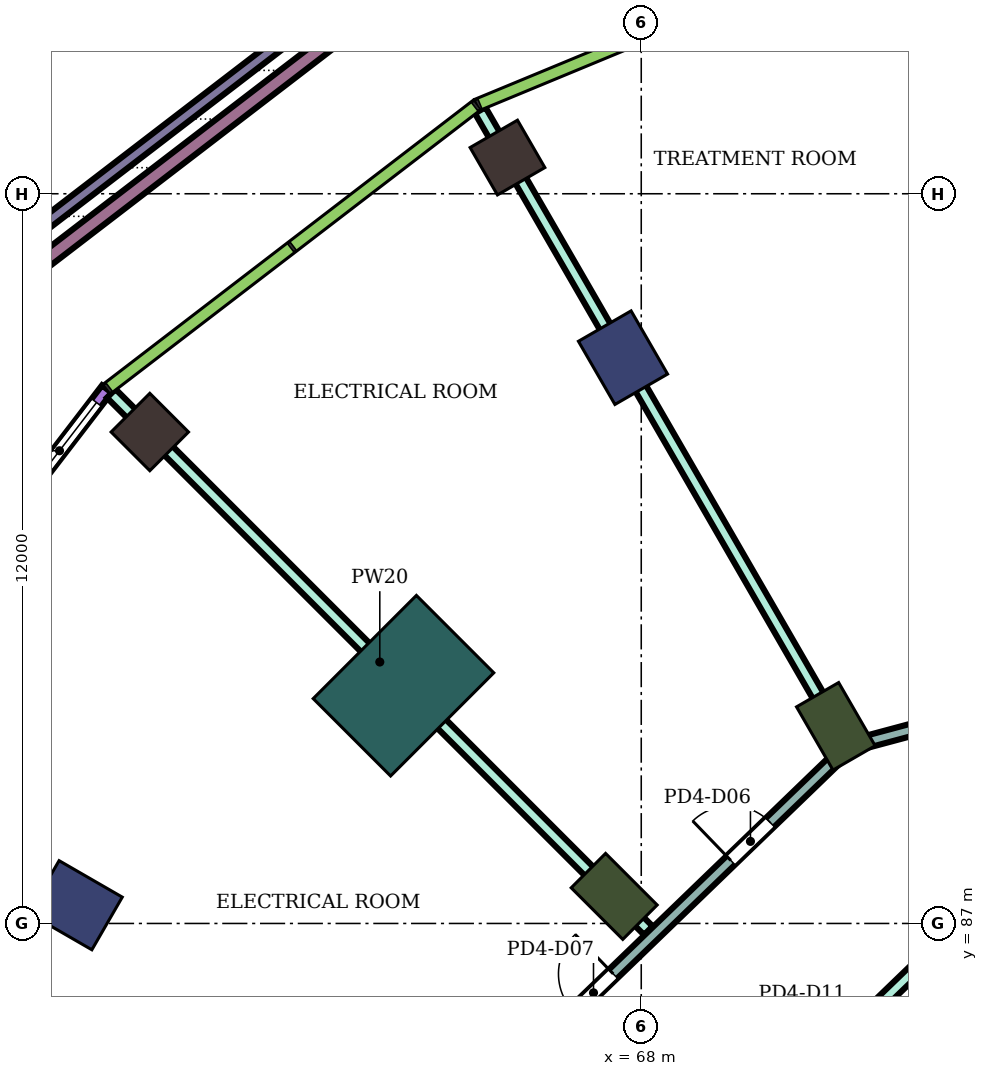
"""IFC4 building model, lengths in metres.
Left out: names, types, materials, properties, quantities, classifications, styles, units other than length and angle.
Written with IfcOpenShell. Run it as: python <this file> out.ifc"""

import sys

from ifc_helpers import new_model, si_unit, direction, frame, frame_2d, origin, origin_2d, place, context, subcontext, project, spatial, rectangle, extrude, element, fill, save


model = new_model("IFC4")
c1 = context("Model", 3, precision=1e-05, world=origin(), true_north=direction((0.0, 1.0)))
c2 = subcontext(c1, "Body", "Model", "MODEL_VIEW")
j1 = project(units=[si_unit("LENGTHUNIT", "METRE"), si_unit("PLANEANGLEUNIT", "RADIAN")], contexts=[c1])
p1 = place(None, origin())
s1 = spatial("IfcSite", under=j1, at=p1, CompositionType="ELEMENT")
p2 = place(p1, origin())
s2 = spatial("IfcBuilding", under=s1, at=p2, CompositionType="ELEMENT")
p3 = place(p2, frame((0.0, 0.0, 23.8)))
s3 = spatial("IfcBuildingStorey", under=s2, at=p3, CompositionType="ELEMENT", Elevation=23.8)
for number, where, z_axis, x_axis in (
    (1, (65.8, 99.595, 0.0), (0.0, 0.0, 1.0), (-0.5, 0.866, 0.0)),
    (2, (59.918, 95.082, 0.0), (0.0, 0.0, 1.0), (-0.707, 0.707, 0.0)),
):
    element("IfcColumn", number, at=place(p3, frame(where, z_axis=z_axis, x_axis=x_axis)), inside=s3, PredefinedType="COLUMN", context=c2, shape_type="SweptSolid", body=[
        extrude(rectangle(XDim=0.9, YDim=0.9, at=origin_2d()), origin(), (0.0, 0.0, 1.0), 5.0),
    ])
for number, where, z_axis, x_axis in (
    (3, (67.7, 96.304, 0.0), (0.0, 0.0, 1.0), (-0.5, 0.866, 0.0)),
    (4, (58.696, 87.3, 0.0), (0.0, 0.0, 1.0), (-0.866, 0.5, 0.0)),
):
    element("IfcColumn", number, at=place(p3, frame(where, z_axis=z_axis, x_axis=x_axis)), inside=s3, PredefinedType="COLUMN", context=c2, shape_type="SweptSolid", body=[
        extrude(rectangle(XDim=1.2, YDim=1.0, at=origin_2d()), origin(), (0.0, 0.0, 1.0), 5.0),
    ])
for number, where, z_axis, x_axis in (
    (5, (71.2, 90.242, 0.0), (0.0, 0.0, 1.0), (-0.5, 0.866, 0.0)),
    (6, (67.555, 87.445, 0.0), (0.0, 0.0, 1.0), (-0.707, 0.707, 0.0)),
):
    element("IfcColumn", number, at=place(p3, frame(where, z_axis=z_axis, x_axis=x_axis)), inside=s3, PredefinedType="COLUMN", context=c2, shape_type="SweptSolid", body=[
        extrude(rectangle(XDim=1.2, YDim=0.8, at=origin_2d()), origin(), (0.0, 0.0, 1.0), 5.0),
    ])
p4 = place(p3, frame((64.09, 90.91, 0.0), z_axis=(0.0, 0.0, 1.0), x_axis=(-0.707106781187, 0.707106781187, 0.0)))
e7 = element("IfcColumn", 7, at=p4, inside=s3, PredefinedType="COLUMN", context=c2, shape_type="SweptSolid", body=[
    extrude(rectangle(XDim=1.8, YDim=2.4, at=origin_2d()), origin(), (0.0, 0.0, 1.0), 5.0),
])
p5 = place(p3, frame((59.212, 95.788, 0.0), z_axis=(0.0, 0.0, 1.0), x_axis=(-0.608758724447, -0.793355415567, 0.0)))
e8 = element("IfcWall", 8, at=p5, inside=s3, PredefinedType="NOTDEFINED", context=c2, shape_type="SweptSolid", body=[
    extrude(rectangle(XDim=7.675, YDim=0.2, at=frame_2d((3.837, 0.0))), origin(), (0.0, 0.0, 1.0), 5.0),
])
p6 = place(p5, frame((0.279, 0.0, 0.9)))
e9 = element("IfcOpeningElement", 9, at=p6, cuts=e8, PredefinedType="OPENING", context=c2, shape_type="SweptSolid", body=[
    extrude(rectangle(XDim=2.0, YDim=2.1, at=frame_2d((1.0, 1.05))), frame((0.0, 0.11, 0.0), z_axis=(0.0, -1.0, 0.0), x_axis=(1.0, 0.0, 0.0)), (0.0, 0.0, 1.0), 0.22),
])
p7 = place(p5, frame((2.937, 0.0, 0.0)))
e10 = element("IfcOpeningElement", 10, at=p7, cuts=e8, PredefinedType="OPENING", context=c2, shape_type="SweptSolid", body=[
    extrude(rectangle(XDim=1.8, YDim=2.4, at=frame_2d((0.9, 1.2))), frame((0.0, 0.11, 0.0), z_axis=(0.0, -1.0, 0.0), x_axis=(1.0, 0.0, 0.0)), (0.0, 0.0, 1.0), 0.22),
])
p8 = place(p5, frame((5.396, 0.0, 0.9)))
e11 = element("IfcOpeningElement", 11, at=p8, cuts=e8, PredefinedType="OPENING", context=c2, shape_type="SweptSolid", body=[
    extrude(rectangle(XDim=2.0, YDim=2.1, at=frame_2d((1.0, 1.05))), frame((0.0, 0.11, 0.0), z_axis=(0.0, -1.0, 0.0), x_axis=(1.0, 0.0, 0.0)), (0.0, 0.0, 1.0), 0.22),
])
p9 = place(p3, frame((57.243, 97.775, 0.0), z_axis=(0.0, 0.0, 1.0), x_axis=(0.793350233536, 0.60876547779, 0.0)))
e12 = element("IfcWall", 12, at=p9, inside=s3, PredefinedType="PARAPET", context=c2, shape_type="SweptSolid", body=[
    extrude(rectangle(XDim=8.379, YDim=0.2, at=frame_2d((4.189, 0.0))), origin(), (0.0, 0.0, 1.0), 1.1),
])
p10 = place(p3, frame((57.578, 97.434, 0.0), z_axis=(0.0, 0.0, 1.0), x_axis=(0.793340216104, 0.608778532401, 0.0)))
e13 = element("IfcWall", 13, at=p10, inside=s3, PredefinedType="USERDEFINED", context=c2, shape_type="SweptSolid", body=[
    extrude(rectangle(XDim=8.256, YDim=0.25, at=frame_2d((4.128, 0.0))), origin(), (0.0, 0.0, 1.0), 0.6),
])
p11 = place(p3, frame((59.284, 95.716, 0.0), z_axis=(0.0, 0.0, 1.0), x_axis=(0.707106781187, -0.707106781187, 0.0)))
e14 = element("IfcWall", 14, at=p11, inside=s3, PredefinedType="PARTITIONING", context=c2, shape_type="SweptSolid", body=[
    extrude(rectangle(XDim=12.492, YDim=0.2, at=frame_2d((6.246, 0.0))), origin(), (0.0, 0.0, 1.0), 4.55),
])
p12 = place(p3, frame((65.351, 100.372, 0.0), z_axis=(0.0, 0.0, 1.0), x_axis=(0.500009026289, -0.866020192391, 0.0)))
e15 = element("IfcWall", 15, at=p12, inside=s3, PredefinedType="PARTITIONING", context=c2, shape_type="SweptSolid", body=[
    extrude(rectangle(XDim=11.996, YDim=0.2, at=frame_2d((5.998, 0.0))), origin(), (0.0, 0.0, 1.0), 4.55),
])
p13 = place(p3, frame((66.22, 84.9, 0.0), z_axis=(0.0, 0.0, 1.0), x_axis=(0.719621348931, 0.694366700068, 0.0)))
e16 = element("IfcWall", 16, at=p13, inside=s3, PredefinedType="PARTITIONING", context=c2, shape_type="SweptSolid", body=[
    extrude(rectangle(XDim=7.173, YDim=0.2, at=frame_2d((3.586, 0.0))), origin(), (0.0, 0.0, 1.0), 4.18),
])
p14 = place(p13, frame((4.519, 0.0, 0.0)))
e17 = element("IfcOpeningElement", 17, at=p14, cuts=e16, PredefinedType="OPENING", context=c2, shape_type="SweptSolid", body=[
    extrude(rectangle(XDim=0.9, YDim=2.1, at=frame_2d((0.45, 1.05))), frame((0.0, 0.11, 0.0), z_axis=(0.0, -1.0, 0.0), x_axis=(1.0, 0.0, 0.0)), (0.0, 0.0, 1.0), 0.22),
])
p15 = place(p13, frame((0.932, 0.0, 0.0)))
e18 = element("IfcOpeningElement", 18, at=p15, cuts=e16, PredefinedType="OPENING", context=c2, shape_type="SweptSolid", body=[
    extrude(rectangle(XDim=0.9, YDim=2.1, at=frame_2d((0.45, 1.05))), frame((0.0, 0.11, 0.0), z_axis=(0.0, -1.0, 0.0), x_axis=(1.0, 0.0, 0.0)), (0.0, 0.0, 1.0), 0.22),
])
p16 = place(p3, frame((69.563, 83.4, 0.0), z_axis=(0.0, 0.0, 1.0), x_axis=(0.719454254864, 0.694539829785, 0.0)))
e19 = element("IfcWall", 19, at=p16, inside=s3, PredefinedType="PARTITIONING", context=c2, shape_type="SweptSolid", body=[
    extrude(rectangle(XDim=4.86, YDim=0.2, at=frame_2d((2.43, 0.0))), origin(), (0.0, 0.0, 1.0), 4.55),
])
p17 = place(p16, frame((2.035, 0.0, 0.0)))
e20 = element("IfcOpeningElement", 20, at=p17, cuts=e19, PredefinedType="OPENING", context=c2, shape_type="SweptSolid", body=[
    extrude(rectangle(XDim=0.9, YDim=2.1, at=frame_2d((0.45, 1.05))), frame((0.0, 0.11, 0.0), z_axis=(0.0, -1.0, 0.0), x_axis=(1.0, 0.0, 0.0)), (0.0, 0.0, 1.0), 0.22),
])
p18 = place(p3, frame((71.411, 89.908, 0.0), z_axis=(0.0, 0.0, 1.0), x_axis=(0.965907314361, 0.258888122678, 0.0)))
e21 = element("IfcWall", 21, at=p18, inside=s3, PredefinedType="PARTITIONING", context=c2, shape_type="SweptSolid", body=[
    extrude(rectangle(XDim=8.802, YDim=0.2, at=frame_2d((4.401, 0.0))), origin(), (0.0, 0.0, 1.0), 4.18),
])
p19 = place(p18, frame((6.205, 0.0, 0.0)))
e22 = element("IfcOpeningElement", 22, at=p19, cuts=e21, PredefinedType="OPENING", context=c2, shape_type="SweptSolid", body=[
    extrude(rectangle(XDim=0.9, YDim=2.1, at=frame_2d((0.45, 1.05))), frame((0.0, 0.11, 0.0), z_axis=(0.0, -1.0, 0.0), x_axis=(1.0, 0.0, 0.0)), (0.0, 0.0, 1.0), 0.22),
])
p20 = place(p18, frame((1.779, 0.0, 0.0)))
e23 = element("IfcOpeningElement", 23, at=p20, cuts=e21, PredefinedType="OPENING", context=c2, shape_type="SweptSolid", body=[
    extrude(rectangle(XDim=0.9, YDim=2.1, at=frame_2d((0.45, 1.05))), frame((0.0, 0.11, 0.0), z_axis=(0.0, -1.0, 0.0), x_axis=(1.0, 0.0, 0.0)), (0.0, 0.0, 1.0), 0.22),
])
p21 = place(p3, frame((72.417, 103.299, 0.0), z_axis=(0.0, 0.0, 1.0), x_axis=(0.258828603923, -0.96592326496, 0.0)))
e24 = element("IfcWall", 24, at=p21, inside=s3, PredefinedType="PARTITIONING", context=c2, shape_type="SweptSolid", body=[
    extrude(rectangle(XDim=12.574, YDim=0.2, at=frame_2d((6.287, 0.0))), origin(), (0.0, 0.0, 1.0), 4.55),
])
p22 = place(p6, origin())
e25 = element("IfcWindow", 25, at=p22, inside=s3, PartitioningType="SINGLE_PANEL", PredefinedType="WINDOW", context=c2, shape_type="SweptSolid", body=[
    extrude(rectangle(XDim=2.0, YDim=2.1, at=frame_2d((1.0, 1.05))), frame((0.0, 0.03, 0.0), z_axis=(0.0, -1.0, 0.0), x_axis=(1.0, 0.0, 0.0)), (0.0, 0.0, 1.0), 0.06),
])
fill(e9, e25)
p23 = place(p14, origin())
e26 = element("IfcDoor", 26, at=p23, inside=s3, OperationType="SINGLE_SWING_LEFT", PredefinedType="DOOR", context=c2, shape_type="SweptSolid", body=[
    extrude(rectangle(XDim=0.9, YDim=2.1, at=frame_2d((0.45, 1.05))), frame((0.0, 0.025, 0.0), z_axis=(0.0, -1.0, 0.0), x_axis=(1.0, 0.0, 0.0)), (0.0, 0.0, 1.0), 0.05),
])
fill(e17, e26)
p24 = place(p15, origin())
e27 = element("IfcDoor", 27, at=p24, inside=s3, OperationType="SINGLE_SWING_RIGHT", PredefinedType="DOOR", context=c2, shape_type="SweptSolid", body=[
    extrude(rectangle(XDim=0.9, YDim=2.1, at=frame_2d((0.45, 1.05))), frame((0.0, 0.025, 0.0), z_axis=(0.0, -1.0, 0.0), x_axis=(1.0, 0.0, 0.0)), (0.0, 0.0, 1.0), 0.05),
])
fill(e18, e27)
save(model, sys.argv[1])
